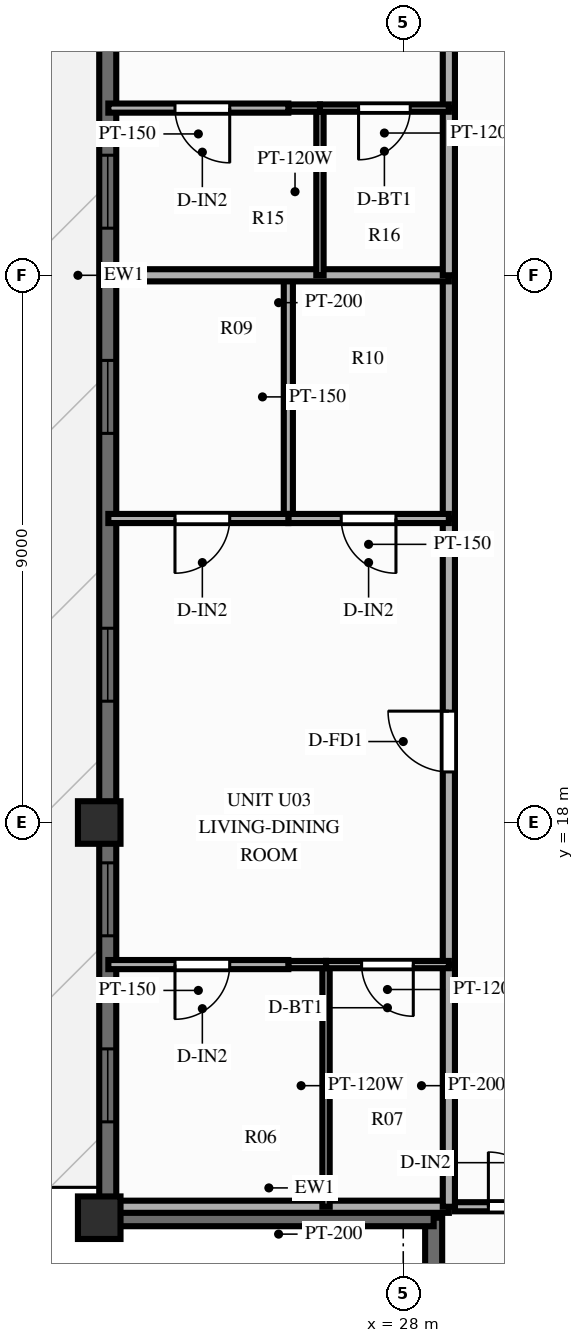
"""IFC4 building model, lengths in metres.
Left out: names, types, materials, properties, quantities, classifications, styles, units other than length and angle.
Written with IfcOpenShell. Run it as: python <this file> out.ifc"""

import sys

from ifc_helpers import new_model, si_unit, direction, frame, frame_2d, origin, origin_2d, place, context, subcontext, project, spatial, rectangle, extrude, source, transform, mapped, element, fill, save


model = new_model("IFC4")
c1 = context("Model", 3, precision=1e-05, world=origin(), true_north=direction((0.0, 1.0)))
c2 = subcontext(c1, "Body", "Model", "MODEL_VIEW")
j1 = project(units=[si_unit("LENGTHUNIT", "METRE"), si_unit("PLANEANGLEUNIT", "RADIAN")], contexts=[c1])
p1 = place(None, origin())
s1 = spatial("IfcSite", under=j1, at=p1, CompositionType="ELEMENT")
p2 = place(p1, origin())
s2 = spatial("IfcBuilding", under=s1, at=p2, CompositionType="ELEMENT")
p3 = place(p2, frame((0.0, 0.0, 240.0)))
s3 = spatial("IfcBuildingStorey", under=s2, at=p3, CompositionType="ELEMENT", Elevation=240.0)
m1 = source(origin(), c2, "Body", "SweptSolid", [
    extrude(rectangle(XDim=0.7, YDim=0.7, at=origin_2d()), origin(), (0.0, 0.0, 1.0), 3.0),
])
for number, where, z_axis, x_axis in (
    (1, (23.0, 18.0, 0.0), (0.0, 0.0, 1.0), (1.0, 0.0, 0.0)),
    (2, (23.0, 11.5, 0.0), (0.0, 0.0, 1.0), (1.0, 0.0, 0.0)),
):
    element("IfcColumn", number, at=place(p3, frame(where, z_axis=z_axis, x_axis=x_axis)), inside=s3, PredefinedType="COLUMN", context=c2, shape_type="MappedRepresentation", body=[
        mapped(m1, transform((0.0, 0.0, 0.0), scale=1.0)),
    ])
p4 = place(p3, frame((23.14, 11.5, 0.0), z_axis=(0.0, 0.0, 1.0), x_axis=(0.0, 1.0, 0.0)))
e3 = element("IfcWall", 3, at=p4, inside=s3, PredefinedType="SOLIDWALL", context=c2, shape_type="SweptSolid", body=[
    extrude(rectangle(XDim=31.0, YDim=0.28, at=frame_2d((15.5, 0.0))), origin(), (0.0, 0.0, 1.0), 2.28),
])
p5 = place(p4, frame((1.577, 0.0, 0.25)))
e4 = element("IfcOpeningElement", 4, at=p5, cuts=e3, PredefinedType="OPENING", context=c2, shape_type="SweptSolid", body=[
    extrude(rectangle(XDim=1.2, YDim=1.5, at=frame_2d((0.6, 0.75))), frame((0.0, 0.152, 0.0), z_axis=(0.0, -1.0, 0.0), x_axis=(1.0, 0.0, 0.0)), (0.0, 0.0, 1.0), 0.304),
])
p6 = place(p4, frame((4.637, 0.0, 0.25)))
e5 = element("IfcOpeningElement", 5, at=p6, cuts=e3, PredefinedType="OPENING", context=c2, shape_type="SweptSolid", body=[
    extrude(rectangle(XDim=1.2, YDim=1.5, at=frame_2d((0.6, 0.75))), frame((0.0, 0.152, 0.0), z_axis=(0.0, -1.0, 0.0), x_axis=(1.0, 0.0, 0.0)), (0.0, 0.0, 1.0), 0.304),
])
p7 = place(p4, frame((8.495, 0.0, 0.25)))
e6 = element("IfcOpeningElement", 6, at=p7, cuts=e3, PredefinedType="OPENING", context=c2, shape_type="SweptSolid", body=[
    extrude(rectangle(XDim=1.2, YDim=1.5, at=frame_2d((0.6, 0.75))), frame((0.0, 0.152, 0.0), z_axis=(0.0, -1.0, 0.0), x_axis=(1.0, 0.0, 0.0)), (0.0, 0.0, 1.0), 0.304),
])
p8 = place(p4, frame((12.9, 0.0, 0.25)))
e7 = element("IfcOpeningElement", 7, at=p8, cuts=e3, PredefinedType="OPENING", context=c2, shape_type="SweptSolid", body=[
    extrude(rectangle(XDim=1.2, YDim=1.5, at=frame_2d((0.6, 0.75))), frame((0.0, 0.152, 0.0), z_axis=(0.0, -1.0, 0.0), x_axis=(1.0, 0.0, 0.0)), (0.0, 0.0, 1.0), 0.304),
])
p9 = place(p4, frame((16.275, 0.0, 0.25)))
e8 = element("IfcOpeningElement", 8, at=p9, cuts=e3, PredefinedType="OPENING", context=c2, shape_type="SweptSolid", body=[
    extrude(rectangle(XDim=1.2, YDim=1.5, at=frame_2d((0.6, 0.75))), frame((0.0, 0.152, 0.0), z_axis=(0.0, -1.0, 0.0), x_axis=(1.0, 0.0, 0.0)), (0.0, 0.0, 1.0), 0.304),
])
p10 = place(p4, frame((20.48, 0.0, 0.0)))
e9 = element("IfcOpeningElement", 9, at=p10, cuts=e3, PredefinedType="OPENING", context=c2, shape_type="SweptSolid", body=[
    extrude(rectangle(XDim=1.6, YDim=2.15, at=frame_2d((0.8, 1.075))), frame((0.0, 0.152, 0.0), z_axis=(0.0, -1.0, 0.0), x_axis=(1.0, 0.0, 0.0)), (0.0, 0.0, 1.0), 0.304),
])
p11 = place(p4, frame((25.155, 0.0, 0.25)))
e10 = element("IfcOpeningElement", 10, at=p11, cuts=e3, PredefinedType="OPENING", context=c2, shape_type="SweptSolid", body=[
    extrude(rectangle(XDim=1.2, YDim=1.5, at=frame_2d((0.6, 0.75))), frame((0.0, 0.152, 0.0), z_axis=(0.0, -1.0, 0.0), x_axis=(1.0, 0.0, 0.0)), (0.0, 0.0, 1.0), 0.304),
])
p12 = place(p4, frame((28.215, 0.0, 0.25)))
e11 = element("IfcOpeningElement", 11, at=p12, cuts=e3, PredefinedType="OPENING", context=c2, shape_type="SweptSolid", body=[
    extrude(rectangle(XDim=1.2, YDim=1.5, at=frame_2d((0.6, 0.75))), frame((0.0, 0.152, 0.0), z_axis=(0.0, -1.0, 0.0), x_axis=(1.0, 0.0, 0.0)), (0.0, 0.0, 1.0), 0.304),
])
for number, where, z_axis, x_axis in (
    (12, (28.5, 6.08, 0.0), (0.0, 0.0, 1.0), (0.0, 1.0, 0.0)),
    (13, (23.08, 11.5, 0.0), (0.0, 0.0, 1.0), (1.0, 0.0, 0.0)),
):
    element("IfcWall", number, at=place(p3, frame(where, z_axis=z_axis, x_axis=x_axis)), inside=s3, PredefinedType="SOLIDWALL", context=c2, shape_type="SweptSolid", body=[
        extrude(rectangle(XDim=5.42, YDim=0.28, at=frame_2d((2.71, 0.0))), origin(), (0.0, 0.0, 1.0), 2.28),
    ])
p13 = place(p3, frame((28.85, 11.68, 0.0), z_axis=(0.0, 0.0, 1.0), x_axis=(1.0, 0.0, 0.0)))
e14 = element("IfcWall", 14, at=p13, inside=s3, PredefinedType="PARTITIONING", context=c2, shape_type="SweptSolid", body=[
    extrude(rectangle(XDim=2.33, YDim=0.15, at=frame_2d((1.165, 0.0))), origin(), (0.0, 0.0, 1.0), 2.79),
])
p14 = place(p13, frame((0.55, 0.0, 0.0)))
e15 = element("IfcOpeningElement", 15, at=p14, cuts=e14, PredefinedType="OPENING", context=c2, shape_type="SweptSolid", body=[
    extrude(rectangle(XDim=0.9, YDim=2.1, at=frame_2d((0.45, 1.05))), frame((0.0, 0.087, 0.0), z_axis=(0.0, -1.0, 0.0), x_axis=(1.0, 0.0, 0.0)), (0.0, 0.0, 1.0), 0.174),
])
p15 = place(p3, frame((28.75, 11.68, 0.0), z_axis=(0.0, 0.0, 1.0), x_axis=(-1.0, 0.0, 0.0)))
e16 = element("IfcWall", 16, at=p15, inside=s3, PredefinedType="PARTITIONING", context=c2, shape_type="SweptSolid", body=[
    extrude(rectangle(XDim=5.6, YDim=0.2, at=frame_2d((2.8, 0.0))), origin(), (0.0, 0.0, 1.0), 2.79),
])
p16 = place(p3, frame((28.75, 11.68, 0.0), z_axis=(0.0, 0.0, 1.0), x_axis=(0.0, 1.0, 0.0)))
e17 = element("IfcWall", 17, at=p16, inside=s3, PredefinedType="PARTITIONING", context=c2, shape_type="SweptSolid", body=[
    extrude(rectangle(XDim=3.983, YDim=0.2, at=frame_2d((1.992, 0.0))), origin(), (0.0, 0.0, 1.0), 2.79),
])
p17 = place(p3, frame((28.75, 15.663, 0.0), z_axis=(0.0, 0.0, 1.0), x_axis=(0.0, 1.0, 0.0)))
e18 = element("IfcWall", 18, at=p17, inside=s3, PredefinedType="PARTITIONING", context=c2, shape_type="SweptSolid", body=[
    extrude(rectangle(XDim=7.337, YDim=0.2, at=frame_2d((3.668, 0.0))), origin(), (0.0, 0.0, 1.0), 2.79),
])
p18 = place(p17, frame((3.168, 0.0, 0.0)))
e19 = element("IfcOpeningElement", 19, at=p18, cuts=e18, PredefinedType="OPENING", context=c2, shape_type="SweptSolid", body=[
    extrude(rectangle(XDim=1.0, YDim=2.15, at=frame_2d((0.5, 1.075))), frame((0.0, 0.112, 0.0), z_axis=(0.0, -1.0, 0.0), x_axis=(1.0, 0.0, 0.0)), (0.0, 0.0, 1.0), 0.224),
])
p19 = place(p3, frame((28.75, 23.0, 0.0), z_axis=(0.0, 0.0, 1.0), x_axis=(0.0, 1.0, 0.0)))
e20 = element("IfcWall", 20, at=p19, inside=s3, PredefinedType="PARTITIONING", context=c2, shape_type="SweptSolid", body=[
    extrude(rectangle(XDim=4.0, YDim=0.2, at=frame_2d((2.0, 0.0))), origin(), (0.0, 0.0, 1.0), 2.79),
])
p20 = place(p3, frame((26.73, 11.68, 0.0), z_axis=(0.0, 0.0, 1.0), x_axis=(0.0, 1.0, 0.0)))
e21 = element("IfcWall", 21, at=p20, inside=s3, PredefinedType="PARTITIONING", context=c2, shape_type="SweptSolid", body=[
    extrude(rectangle(XDim=3.983, YDim=0.12, at=frame_2d((1.992, 0.0))), origin(), (0.0, 0.0, 1.0), 2.79),
])
p21 = place(p3, frame((26.11, 23.0, 0.0), z_axis=(0.0, 0.0, 1.0), x_axis=(0.0, 1.0, 0.0)))
e22 = element("IfcWall", 22, at=p21, inside=s3, PredefinedType="PARTITIONING", context=c2, shape_type="SweptSolid", body=[
    extrude(rectangle(XDim=4.0, YDim=0.15, at=frame_2d((2.0, 0.0))), origin(), (0.0, 0.0, 1.0), 2.79),
])
p22 = place(p3, frame((28.75, 15.663, 0.0), z_axis=(0.0, 0.0, 1.0), x_axis=(-1.0, 0.0, 0.0)))
e23 = element("IfcWall", 23, at=p22, inside=s3, PredefinedType="PARTITIONING", context=c2, shape_type="SweptSolid", body=[
    extrude(rectangle(XDim=2.02, YDim=0.12, at=frame_2d((1.01, 0.0))), origin(), (0.0, 0.0, 1.0), 2.79),
])
p23 = place(p22, frame((0.585, 0.0, 0.0)))
e24 = element("IfcOpeningElement", 24, at=p23, cuts=e23, PredefinedType="OPENING", context=c2, shape_type="SweptSolid", body=[
    extrude(rectangle(XDim=0.85, YDim=2.05, at=frame_2d((0.425, 1.025))), frame((0.0, 0.072, 0.0), z_axis=(0.0, -1.0, 0.0), x_axis=(1.0, 0.0, 0.0)), (0.0, 0.0, 1.0), 0.144),
])
p24 = place(p3, frame((26.73, 15.663, 0.0), z_axis=(0.0, 0.0, 1.0), x_axis=(-1.0, 0.0, 0.0)))
e25 = element("IfcWall", 25, at=p24, inside=s3, PredefinedType="PARTITIONING", context=c2, shape_type="SweptSolid", body=[
    extrude(rectangle(XDim=0.62, YDim=0.12, at=frame_2d((0.31, 0.0))), origin(), (0.0, 0.0, 1.0), 2.79),
])
p25 = place(p3, frame((26.11, 15.663, 0.0), z_axis=(0.0, 0.0, 1.0), x_axis=(-1.0, 0.0, 0.0)))
e26 = element("IfcWall", 26, at=p25, inside=s3, PredefinedType="PARTITIONING", context=c2, shape_type="SweptSolid", body=[
    extrude(rectangle(XDim=2.96, YDim=0.15, at=frame_2d((1.48, 0.0))), origin(), (0.0, 0.0, 1.0), 2.79),
])
p26 = place(p25, frame((0.964, 0.0, 0.0)))
e27 = element("IfcOpeningElement", 27, at=p26, cuts=e26, PredefinedType="OPENING", context=c2, shape_type="SweptSolid", body=[
    extrude(rectangle(XDim=0.9, YDim=2.1, at=frame_2d((0.45, 1.05))), frame((0.0, 0.087, 0.0), z_axis=(0.0, -1.0, 0.0), x_axis=(1.0, 0.0, 0.0)), (0.0, 0.0, 1.0), 0.174),
])
p27 = place(p3, frame((28.75, 23.0, 0.0), z_axis=(0.0, 0.0, 1.0), x_axis=(-1.0, 0.0, 0.0)))
e28 = element("IfcWall", 28, at=p27, inside=s3, PredefinedType="PARTITIONING", context=c2, shape_type="SweptSolid", body=[
    extrude(rectangle(XDim=2.64, YDim=0.15, at=frame_2d((1.32, 0.0))), origin(), (0.0, 0.0, 1.0), 2.79),
])
p28 = place(p27, frame((0.87, 0.0, 0.0)))
e29 = element("IfcOpeningElement", 29, at=p28, cuts=e28, PredefinedType="OPENING", context=c2, shape_type="SweptSolid", body=[
    extrude(rectangle(XDim=0.9, YDim=2.1, at=frame_2d((0.45, 1.05))), frame((0.0, 0.087, 0.0), z_axis=(0.0, -1.0, 0.0), x_axis=(1.0, 0.0, 0.0)), (0.0, 0.0, 1.0), 0.174),
])
p29 = place(p3, frame((26.11, 23.0, 0.0), z_axis=(0.0, 0.0, 1.0), x_axis=(-1.0, 0.0, 0.0)))
e30 = element("IfcWall", 30, at=p29, inside=s3, PredefinedType="PARTITIONING", context=c2, shape_type="SweptSolid", body=[
    extrude(rectangle(XDim=2.96, YDim=0.15, at=frame_2d((1.48, 0.0))), origin(), (0.0, 0.0, 1.0), 2.79),
])
p30 = place(p29, frame((0.964, 0.0, 0.0)))
e31 = element("IfcOpeningElement", 31, at=p30, cuts=e30, PredefinedType="OPENING", context=c2, shape_type="SweptSolid", body=[
    extrude(rectangle(XDim=0.9, YDim=2.1, at=frame_2d((0.45, 1.05))), frame((0.0, 0.087, 0.0), z_axis=(0.0, -1.0, 0.0), x_axis=(1.0, 0.0, 0.0)), (0.0, 0.0, 1.0), 0.174),
])
p31 = place(p3, frame((28.75, 27.0, 0.0), z_axis=(0.0, 0.0, 1.0), x_axis=(-1.0, 0.0, 0.0)))
e32 = element("IfcWall", 32, at=p31, inside=s3, PredefinedType="PARTITIONING", context=c2, shape_type="SweptSolid", body=[
    extrude(rectangle(XDim=5.6, YDim=0.2, at=frame_2d((2.8, 0.0))), origin(), (0.0, 0.0, 1.0), 2.79),
])
p32 = place(p3, frame((28.75, 27.0, 0.0), z_axis=(0.0, 0.0, 1.0), x_axis=(0.0, 1.0, 0.0)))
e33 = element("IfcWall", 33, at=p32, inside=s3, PredefinedType="PARTITIONING", context=c2, shape_type="SweptSolid", body=[
    extrude(rectangle(XDim=2.75, YDim=0.2, at=frame_2d((1.375, 0.0))), origin(), (0.0, 0.0, 1.0), 2.79),
])
p33 = place(p3, frame((28.75, 29.75, 0.0), z_axis=(0.0, 0.0, 1.0), x_axis=(0.0, 1.0, 0.0)))
e34 = element("IfcWall", 34, at=p33, inside=s3, PredefinedType="PARTITIONING", context=c2, shape_type="SweptSolid", body=[
    extrude(rectangle(XDim=8.57, YDim=0.2, at=frame_2d((4.285, 0.0))), origin(), (0.0, 0.0, 1.0), 2.79),
])
p34 = place(p33, frame((3.785, 0.0, 0.0)))
e35 = element("IfcOpeningElement", 35, at=p34, cuts=e34, PredefinedType="OPENING", context=c2, shape_type="SweptSolid", body=[
    extrude(rectangle(XDim=1.0, YDim=2.15, at=frame_2d((0.5, 1.075))), frame((0.0, 0.112, 0.0), z_axis=(0.0, -1.0, 0.0), x_axis=(1.0, 0.0, 0.0)), (0.0, 0.0, 1.0), 0.224),
])
p35 = place(p3, frame((26.63, 27.0, 0.0), z_axis=(0.0, 0.0, 1.0), x_axis=(0.0, 1.0, 0.0)))
e36 = element("IfcWall", 36, at=p35, inside=s3, PredefinedType="PARTITIONING", context=c2, shape_type="SweptSolid", body=[
    extrude(rectangle(XDim=2.75, YDim=0.12, at=frame_2d((1.375, 0.0))), origin(), (0.0, 0.0, 1.0), 2.49),
])
p36 = place(p3, frame((28.75, 29.75, 0.0), z_axis=(0.0, 0.0, 1.0), x_axis=(-1.0, 0.0, 0.0)))
e37 = element("IfcWall", 37, at=p36, inside=s3, PredefinedType="PARTITIONING", context=c2, shape_type="SweptSolid", body=[
    extrude(rectangle(XDim=2.12, YDim=0.12, at=frame_2d((1.06, 0.0))), origin(), (0.0, 0.0, 1.0), 2.79),
])
p37 = place(p36, frame((0.635, 0.0, 0.0)))
e38 = element("IfcOpeningElement", 38, at=p37, cuts=e37, PredefinedType="OPENING", context=c2, shape_type="SweptSolid", body=[
    extrude(rectangle(XDim=0.85, YDim=2.05, at=frame_2d((0.425, 1.025))), frame((0.0, 0.072, 0.0), z_axis=(0.0, -1.0, 0.0), x_axis=(1.0, 0.0, 0.0)), (0.0, 0.0, 1.0), 0.144),
])
p38 = place(p3, frame((26.63, 29.75, 0.0), z_axis=(0.0, 0.0, 1.0), x_axis=(-1.0, 0.0, 0.0)))
e39 = element("IfcWall", 39, at=p38, inside=s3, PredefinedType="PARTITIONING", context=c2, shape_type="SweptSolid", body=[
    extrude(rectangle(XDim=0.52, YDim=0.12, at=frame_2d((0.26, 0.0))), origin(), (0.0, 0.0, 1.0), 2.79),
])
p39 = place(p3, frame((26.11, 29.75, 0.0), z_axis=(0.0, 0.0, 1.0), x_axis=(-1.0, 0.0, 0.0)))
e40 = element("IfcWall", 40, at=p39, inside=s3, PredefinedType="PARTITIONING", context=c2, shape_type="SweptSolid", body=[
    extrude(rectangle(XDim=2.96, YDim=0.15, at=frame_2d((1.48, 0.0))), origin(), (0.0, 0.0, 1.0), 2.79),
])
p40 = place(p39, frame((0.964, 0.0, 0.0)))
e41 = element("IfcOpeningElement", 41, at=p40, cuts=e40, PredefinedType="OPENING", context=c2, shape_type="SweptSolid", body=[
    extrude(rectangle(XDim=0.9, YDim=2.1, at=frame_2d((0.45, 1.05))), frame((0.0, 0.087, 0.0), z_axis=(0.0, -1.0, 0.0), x_axis=(1.0, 0.0, 0.0)), (0.0, 0.0, 1.0), 0.174),
])
m2 = source(origin(), c2, "Body", "SweptSolid", [
    extrude(rectangle(XDim=1.2, YDim=1.5, at=frame_2d((0.6, 0.75))), frame((0.0, 0.03, 0.0), z_axis=(0.0, -1.0, 0.0), x_axis=(1.0, 0.0, 0.0)), (0.0, 0.0, 1.0), 0.06),
])
p41 = place(p5, origin())
e42 = element("IfcWindow", 42, at=p41, inside=s3, PartitioningType="SINGLE_PANEL", PredefinedType="WINDOW", context=c2, shape_type="MappedRepresentation", body=[
    mapped(m2, transform((0.0, 0.0, 0.0), scale=1.0)),
])
fill(e4, e42)
p42 = place(p6, origin())
e43 = element("IfcWindow", 43, at=p42, inside=s3, PartitioningType="SINGLE_PANEL", PredefinedType="WINDOW", context=c2, shape_type="MappedRepresentation", body=[
    mapped(m2, transform((0.0, 0.0, 0.0), scale=1.0)),
])
fill(e5, e43)
p43 = place(p7, origin())
e44 = element("IfcWindow", 44, at=p43, inside=s3, PartitioningType="SINGLE_PANEL", PredefinedType="WINDOW", context=c2, shape_type="MappedRepresentation", body=[
    mapped(m2, transform((0.0, 0.0, 0.0), scale=1.0)),
])
fill(e6, e44)
p44 = place(p8, origin())
e45 = element("IfcWindow", 45, at=p44, inside=s3, PartitioningType="SINGLE_PANEL", PredefinedType="WINDOW", context=c2, shape_type="MappedRepresentation", body=[
    mapped(m2, transform((0.0, 0.0, 0.0), scale=1.0)),
])
fill(e7, e45)
p45 = place(p9, origin())
e46 = element("IfcWindow", 46, at=p45, inside=s3, PartitioningType="SINGLE_PANEL", PredefinedType="WINDOW", context=c2, shape_type="MappedRepresentation", body=[
    mapped(m2, transform((0.0, 0.0, 0.0), scale=1.0)),
])
fill(e8, e46)
m3 = source(origin(), c2, "Body", "SweptSolid", [
    extrude(rectangle(XDim=0.9, YDim=2.1, at=frame_2d((0.45, 1.05))), frame((0.0, 0.025, 0.0), z_axis=(0.0, -1.0, 0.0), x_axis=(1.0, 0.0, 0.0)), (0.0, 0.0, 1.0), 0.05),
])
p46 = place(p14, origin())
e47 = element("IfcDoor", 47, at=p46, inside=s3, OperationType="SINGLE_SWING_LEFT", PredefinedType="DOOR", context=c2, shape_type="MappedRepresentation", body=[
    mapped(m3, transform((0.0, 0.0, 0.0), scale=1.0)),
])
fill(e15, e47)
m4 = source(origin(), c2, "Body", "SweptSolid", [
    extrude(rectangle(XDim=1.0, YDim=2.15, at=frame_2d((0.5, 1.075))), frame((0.0, 0.025, 0.0), z_axis=(0.0, -1.0, 0.0), x_axis=(1.0, 0.0, 0.0)), (0.0, 0.0, 1.0), 0.05),
])
p47 = place(p18, origin())
e48 = element("IfcDoor", 48, at=p47, inside=s3, OperationType="SINGLE_SWING_RIGHT", PredefinedType="DOOR", context=c2, shape_type="MappedRepresentation", body=[
    mapped(m4, transform((0.0, 0.0, 0.0), scale=1.0)),
])
fill(e19, e48)
m5 = source(origin(), c2, "Body", "SweptSolid", [
    extrude(rectangle(XDim=0.85, YDim=2.05, at=frame_2d((0.425, 1.025))), frame((0.0, 0.025, 0.0), z_axis=(0.0, -1.0, 0.0), x_axis=(1.0, 0.0, 0.0)), (0.0, 0.0, 1.0), 0.05),
])
p48 = place(p23, origin())
e49 = element("IfcDoor", 49, at=p48, inside=s3, OperationType="SINGLE_SWING_LEFT", PredefinedType="DOOR", context=c2, shape_type="MappedRepresentation", body=[
    mapped(m5, transform((0.0, 0.0, 0.0), scale=1.0)),
])
fill(e24, e49)
p49 = place(p26, origin())
e50 = element("IfcDoor", 50, at=p49, inside=s3, OperationType="SINGLE_SWING_RIGHT", PredefinedType="DOOR", context=c2, shape_type="MappedRepresentation", body=[
    mapped(m3, transform((0.0, 0.0, 0.0), scale=1.0)),
])
fill(e27, e50)
p50 = place(p28, origin())
e51 = element("IfcDoor", 51, at=p50, inside=s3, OperationType="SINGLE_SWING_LEFT", PredefinedType="DOOR", context=c2, shape_type="MappedRepresentation", body=[
    mapped(m3, transform((0.0, 0.0, 0.0), scale=1.0)),
])
fill(e29, e51)
p51 = place(p30, origin())
e52 = element("IfcDoor", 52, at=p51, inside=s3, OperationType="SINGLE_SWING_RIGHT", PredefinedType="DOOR", context=c2, shape_type="MappedRepresentation", body=[
    mapped(m3, transform((0.0, 0.0, 0.0), scale=1.0)),
])
fill(e31, e52)
p52 = place(p37, origin())
e53 = element("IfcDoor", 53, at=p52, inside=s3, OperationType="SINGLE_SWING_RIGHT", PredefinedType="DOOR", context=c2, shape_type="MappedRepresentation", body=[
    mapped(m5, transform((0.0, 0.0, 0.0), scale=1.0)),
])
fill(e38, e53)
p53 = place(p40, origin())
e54 = element("IfcDoor", 54, at=p53, inside=s3, OperationType="SINGLE_SWING_LEFT", PredefinedType="DOOR", context=c2, shape_type="MappedRepresentation", body=[
    mapped(m3, transform((0.0, 0.0, 0.0), scale=1.0)),
])
fill(e41, e54)
save(model, sys.argv[1])
